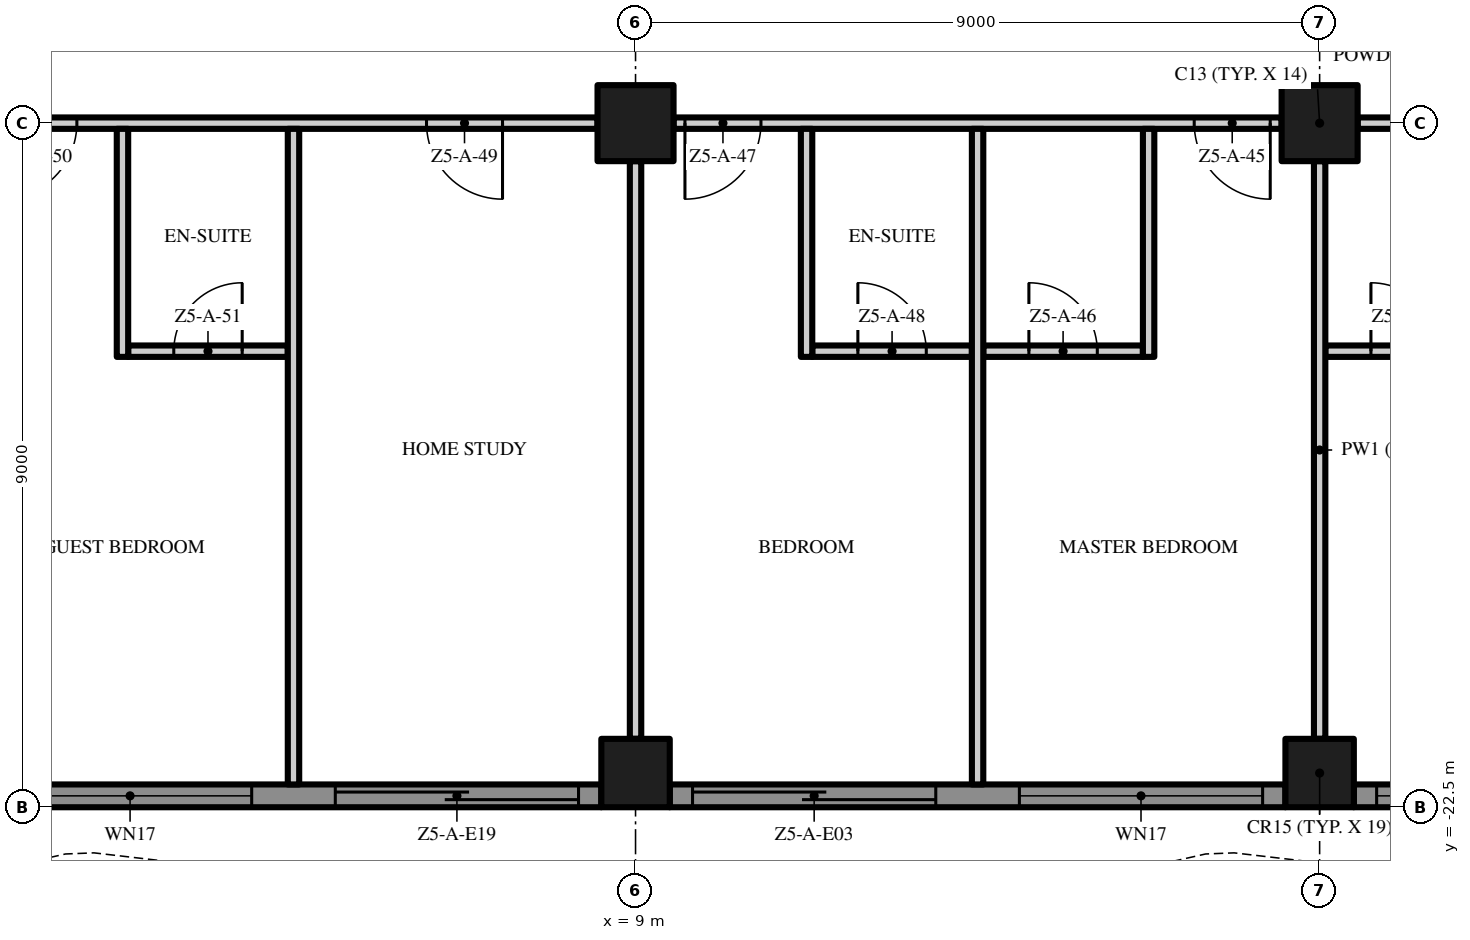
"""IFC4 building model, lengths in metres.
Left out: names, types, materials, properties, quantities, classifications, styles, units other than length and angle.
Written with IfcOpenShell. Run it as: python <this file> out.ifc"""

import sys

from ifc_helpers import new_model, si_unit, direction, frame, frame_2d, origin, origin_2d, place, context, subcontext, project, spatial, polyline, rectangle, outline, extrude, element, fill, save


model = new_model("IFC4")
c1 = context("Model", 3, precision=1e-05, world=origin(), true_north=direction((0.0, 1.0)))
c2 = subcontext(c1, "Body", "Model", "MODEL_VIEW")
j1 = project(units=[si_unit("LENGTHUNIT", "METRE"), si_unit("PLANEANGLEUNIT", "RADIAN")], contexts=[c1])
p1 = place(None, origin())
s1 = spatial("IfcSite", under=j1, at=p1, CompositionType="ELEMENT")
p2 = place(p1, origin())
s2 = spatial("IfcBuilding", under=s1, at=p2, CompositionType="ELEMENT")
p3 = place(p2, frame((0.0, 0.0, 246.4)))
s3 = spatial("IfcBuildingStorey", under=s2, at=p3, CompositionType="ELEMENT", Elevation=246.4)
p4 = place(p3, frame((18.0, -13.5, 0.0), z_axis=(0.0, 0.0, 1.0), x_axis=(1.0, 0.0, 0.0)))
e1 = element("IfcColumn", 1, at=p4, inside=s3, PredefinedType="COLUMN", context=c2, shape_type="SweptSolid", body=[
    extrude(rectangle(XDim=1.0, YDim=1.0, at=origin_2d()), origin(), (0.0, 0.0, 1.0), 3.5),
])
p5 = place(p3, frame((18.0, -22.05, 0.0), z_axis=(0.0, 0.0, 1.0), x_axis=(1.0, 0.0, 0.0)))
e2 = element("IfcColumn", 2, at=p5, inside=s3, PredefinedType="COLUMN", context=c2, shape_type="SweptSolid", body=[
    extrude(rectangle(XDim=0.9, YDim=0.9, at=origin_2d()), origin(), (0.0, 0.0, 1.0), 3.5),
])
p6 = place(p3, frame((9.0, -13.5, 0.0), z_axis=(0.0, 0.0, 1.0), x_axis=(1.0, 0.0, 0.0)))
e3 = element("IfcColumn", 3, at=p6, inside=s3, PredefinedType="COLUMN", context=c2, shape_type="SweptSolid", body=[
    extrude(rectangle(XDim=1.0, YDim=1.0, at=origin_2d()), origin(), (0.0, 0.0, 1.0), 3.5),
])
p7 = place(p3, frame((9.0, -22.05, 0.0), z_axis=(0.0, 0.0, 1.0), x_axis=(1.0, 0.0, 0.0)))
e4 = element("IfcColumn", 4, at=p7, inside=s3, PredefinedType="COLUMN", context=c2, shape_type="SweptSolid", body=[
    extrude(rectangle(XDim=0.9, YDim=0.9, at=origin_2d()), origin(), (0.0, 0.0, 1.0), 3.5),
])
p8 = place(p3, frame((8.55, -22.35, 0.0), z_axis=(0.0, 0.0, 1.0), x_axis=(-1.0, 0.0, 0.0)))
e5 = element("IfcWall", 5, at=p8, inside=s3, PredefinedType="SOLIDWALL", context=c2, shape_type="SweptSolid", body=[
    extrude(rectangle(XDim=8.1, YDim=0.3, at=frame_2d((4.05, 0.0))), origin(), (0.0, 0.0, 1.0), 3.5),
])
p9 = place(p8, frame((4.6, 0.0, 0.45)))
e6 = element("IfcOpeningElement", 6, at=p9, cuts=e5, PredefinedType="OPENING", context=c2, shape_type="SweptSolid", body=[
    extrude(rectangle(XDim=3.2, YDim=2.65, at=frame_2d((1.6, 1.325))), frame((0.0, 0.16, 0.0), z_axis=(0.0, -1.0, 0.0), x_axis=(1.0, 0.0, 0.0)), (0.0, 0.0, 1.0), 0.32),
])
p10 = place(p8, frame((0.3, 0.0, 0.0)))
e7 = element("IfcOpeningElement", 7, at=p10, cuts=e5, PredefinedType="OPENING", context=c2, shape_type="SweptSolid", body=[
    extrude(rectangle(XDim=3.2, YDim=2.4, at=frame_2d((1.6, 1.2))), frame((0.0, 0.16, 0.0), z_axis=(0.0, -1.0, 0.0), x_axis=(1.0, 0.0, 0.0)), (0.0, 0.0, 1.0), 0.32),
])
p11 = place(p3, frame((17.55, -22.35, 0.0), z_axis=(0.0, 0.0, 1.0), x_axis=(-1.0, 0.0, 0.0)))
e8 = element("IfcWall", 8, at=p11, inside=s3, PredefinedType="SOLIDWALL", context=c2, shape_type="SweptSolid", body=[
    extrude(rectangle(XDim=8.1, YDim=0.3, at=frame_2d((4.05, 0.0))), origin(), (0.0, 0.0, 1.0), 3.5),
])
p12 = place(p11, frame((4.6, 0.0, 0.0)))
e9 = element("IfcOpeningElement", 9, at=p12, cuts=e8, PredefinedType="OPENING", context=c2, shape_type="SweptSolid", body=[
    extrude(rectangle(XDim=3.2, YDim=2.4, at=frame_2d((1.6, 1.2))), frame((0.0, 0.16, 0.0), z_axis=(0.0, -1.0, 0.0), x_axis=(1.0, 0.0, 0.0)), (0.0, 0.0, 1.0), 0.32),
])
p13 = place(p11, frame((0.3, 0.0, 0.45)))
e10 = element("IfcOpeningElement", 10, at=p13, cuts=e8, PredefinedType="OPENING", context=c2, shape_type="SweptSolid", body=[
    extrude(rectangle(XDim=3.2, YDim=2.65, at=frame_2d((1.6, 1.325))), frame((0.0, 0.16, 0.0), z_axis=(0.0, -1.0, 0.0), x_axis=(1.0, 0.0, 0.0)), (0.0, 0.0, 1.0), 0.32),
])
p14 = place(p3, frame((22.5, -22.35, 0.0), z_axis=(0.0, 0.0, 1.0), x_axis=(-1.0, 0.0, 0.0)))
e11 = element("IfcWall", 11, at=p14, inside=s3, PredefinedType="SOLIDWALL", context=c2, shape_type="SweptSolid", body=[
    extrude(rectangle(XDim=4.05, YDim=0.3, at=frame_2d((2.025, 0.0))), origin(), (0.0, 0.0, 1.0), 3.5),
])
p15 = place(p14, frame((0.55, 0.0, 0.45)))
e12 = element("IfcOpeningElement", 12, at=p15, cuts=e11, PredefinedType="OPENING", context=c2, shape_type="SweptSolid", body=[
    extrude(rectangle(XDim=3.2, YDim=2.65, at=frame_2d((1.6, 1.325))), frame((0.0, 0.16, 0.0), z_axis=(0.0, -1.0, 0.0), x_axis=(1.0, 0.0, 0.0)), (0.0, 0.0, 1.0), 0.32),
])
p16 = place(p3, origin())
e13 = element("IfcWall", 13, at=p16, inside=s3, PredefinedType="USERDEFINED", context=c2, shape_type="SweptSolid", body=[
    extrude(outline(polyline([(-22.5, -25.149), (-21.0, -25.485), (-20.625, -25.5), (-19.5, -25.369), (-18.0, -24.845), (-16.5, -24.112), (-15.0, -23.451), (-13.5, -23.115), (-13.125, -23.1), (-12.0, -23.231), (-10.5, -23.755), (-9.0, -24.488), (-7.5, -25.149), (-6.0, -25.485), (-5.625, -25.5), (-4.5, -25.369), (-3.0, -24.845), (-1.5, -24.112), (0.0, -23.451), (1.5, -23.115), (1.875, -23.1), (3.0, -23.231), (4.5, -23.755), (6.0, -24.488), (7.5, -25.149), (9.0, -25.485), (9.375, -25.5), (10.5, -25.369), (12.0, -24.845), (13.5, -24.112), (15.0, -23.451), (16.5, -23.115), (16.875, -23.1), (18.0, -23.231), (19.5, -23.755), (21.0, -24.488), (22.5, -25.149), (22.601, -24.92), (21.105, -24.261), (19.596, -23.524), (18.056, -22.986), (16.885, -22.849), (16.467, -22.866), (14.921, -23.213), (13.395, -23.885), (11.904, -24.614), (10.444, -25.124), (9.365, -25.249), (9.033, -25.236), (7.579, -24.91), (6.105, -24.261), (4.596, -23.524), (3.056, -22.986), (1.885, -22.849), (1.467, -22.866), (-0.079, -23.213), (-1.605, -23.885), (-3.096, -24.614), (-4.556, -25.124), (-5.635, -25.249), (-5.967, -25.236), (-7.421, -24.91), (-8.895, -24.261), (-10.404, -23.524), (-11.944, -22.986), (-13.115, -22.849), (-13.533, -22.866), (-15.079, -23.213), (-16.605, -23.885), (-18.096, -24.614), (-19.556, -25.124), (-20.635, -25.249), (-20.967, -25.236), (-22.445, -24.905), (-22.5, -25.149)])), origin(), (0.0, 0.0, 1.0), 0.9),
])
p17 = place(p3, frame((2.325, -16.5, 0.0), z_axis=(0.0, 0.0, 1.0), x_axis=(1.0, 0.0, 0.0)))
e14 = element("IfcWall", 14, at=p17, inside=s3, PredefinedType="PARTITIONING", context=c2, shape_type="SweptSolid", body=[
    extrude(rectangle(XDim=2.1, YDim=0.15, at=frame_2d((1.05, 0.0))), origin(), (0.0, 0.0, 1.0), 3.5),
])
p18 = place(p17, frame((0.6, 0.0, 0.0)))
e15 = element("IfcOpeningElement", 15, at=p18, cuts=e14, PredefinedType="OPENING", context=c2, shape_type="SweptSolid", body=[
    extrude(rectangle(XDim=0.9, YDim=2.1, at=frame_2d((0.45, 1.05))), frame((0.0, 0.085, 0.0), z_axis=(0.0, -1.0, 0.0), x_axis=(1.0, 0.0, 0.0)), (0.0, 0.0, 1.0), 0.17),
])
p19 = place(p3, frame((11.325, -16.5, 0.0), z_axis=(0.0, 0.0, 1.0), x_axis=(1.0, 0.0, 0.0)))
e16 = element("IfcWall", 16, at=p19, inside=s3, PredefinedType="PARTITIONING", context=c2, shape_type="SweptSolid", body=[
    extrude(rectangle(XDim=2.1, YDim=0.15, at=frame_2d((1.05, 0.0))), origin(), (0.0, 0.0, 1.0), 3.5),
])
p20 = place(p19, frame((0.6, 0.0, 0.0)))
e17 = element("IfcOpeningElement", 17, at=p20, cuts=e16, PredefinedType="OPENING", context=c2, shape_type="SweptSolid", body=[
    extrude(rectangle(XDim=0.9, YDim=2.1, at=frame_2d((0.45, 1.05))), frame((0.0, 0.085, 0.0), z_axis=(0.0, -1.0, 0.0), x_axis=(1.0, 0.0, 0.0)), (0.0, 0.0, 1.0), 0.17),
])
p21 = place(p3, frame((13.575, -16.5, 0.0), z_axis=(0.0, 0.0, 1.0), x_axis=(1.0, 0.0, 0.0)))
e18 = element("IfcWall", 18, at=p21, inside=s3, PredefinedType="PARTITIONING", context=c2, shape_type="SweptSolid", body=[
    extrude(rectangle(XDim=2.1, YDim=0.15, at=frame_2d((1.05, 0.0))), origin(), (0.0, 0.0, 1.0), 3.5),
])
p22 = place(p21, frame((0.6, 0.0, 0.0)))
e19 = element("IfcOpeningElement", 19, at=p22, cuts=e18, PredefinedType="OPENING", context=c2, shape_type="SweptSolid", body=[
    extrude(rectangle(XDim=0.9, YDim=2.1, at=frame_2d((0.45, 1.05))), frame((0.0, 0.085, 0.0), z_axis=(0.0, -1.0, 0.0), x_axis=(1.0, 0.0, 0.0)), (0.0, 0.0, 1.0), 0.17),
])
p23 = place(p3, frame((18.075, -16.5, 0.0), z_axis=(0.0, 0.0, 1.0), x_axis=(1.0, 0.0, 0.0)))
e20 = element("IfcWall", 20, at=p23, inside=s3, PredefinedType="PARTITIONING", context=c2, shape_type="SweptSolid", body=[
    extrude(rectangle(XDim=2.1, YDim=0.15, at=frame_2d((1.05, 0.0))), origin(), (0.0, 0.0, 1.0), 3.5),
])
p24 = place(p23, frame((0.6, 0.0, 0.0)))
e21 = element("IfcOpeningElement", 21, at=p24, cuts=e20, PredefinedType="OPENING", context=c2, shape_type="SweptSolid", body=[
    extrude(rectangle(XDim=0.9, YDim=2.1, at=frame_2d((0.45, 1.05))), frame((0.0, 0.085, 0.0), z_axis=(0.0, -1.0, 0.0), x_axis=(1.0, 0.0, 0.0)), (0.0, 0.0, 1.0), 0.17),
])
p25 = place(p3, frame((8.5, -13.5, 0.0), z_axis=(0.0, 0.0, 1.0), x_axis=(-1.0, 0.0, 0.0)))
e22 = element("IfcWall", 22, at=p25, inside=s3, PredefinedType="PARTITIONING", context=c2, shape_type="SweptSolid", body=[
    extrude(rectangle(XDim=8.0, YDim=0.15, at=frame_2d((4.0, 0.0))), origin(), (0.0, 0.0, 1.0), 3.5),
])
p26 = place(p25, frame((1.25, 0.0, 0.0)))
e23 = element("IfcOpeningElement", 23, at=p26, cuts=e22, PredefinedType="OPENING", context=c2, shape_type="SweptSolid", body=[
    extrude(rectangle(XDim=1.0, YDim=2.4, at=frame_2d((0.5, 1.2))), frame((0.0, 0.085, 0.0), z_axis=(0.0, -1.0, 0.0), x_axis=(1.0, 0.0, 0.0)), (0.0, 0.0, 1.0), 0.17),
])
p27 = place(p25, frame((6.85, 0.0, 0.0)))
e24 = element("IfcOpeningElement", 24, at=p27, cuts=e22, PredefinedType="OPENING", context=c2, shape_type="SweptSolid", body=[
    extrude(rectangle(XDim=1.0, YDim=2.4, at=frame_2d((0.5, 1.2))), frame((0.0, 0.085, 0.0), z_axis=(0.0, -1.0, 0.0), x_axis=(1.0, 0.0, 0.0)), (0.0, 0.0, 1.0), 0.17),
])
p28 = place(p3, frame((17.5, -13.5, 0.0), z_axis=(0.0, 0.0, 1.0), x_axis=(-1.0, 0.0, 0.0)))
e25 = element("IfcWall", 25, at=p28, inside=s3, PredefinedType="PARTITIONING", context=c2, shape_type="SweptSolid", body=[
    extrude(rectangle(XDim=8.0, YDim=0.15, at=frame_2d((4.0, 0.0))), origin(), (0.0, 0.0, 1.0), 3.5),
])
p29 = place(p28, frame((0.15, 0.0, 0.0)))
e26 = element("IfcOpeningElement", 26, at=p29, cuts=e25, PredefinedType="OPENING", context=c2, shape_type="SweptSolid", body=[
    extrude(rectangle(XDim=1.0, YDim=2.4, at=frame_2d((0.5, 1.2))), frame((0.0, 0.085, 0.0), z_axis=(0.0, -1.0, 0.0), x_axis=(1.0, 0.0, 0.0)), (0.0, 0.0, 1.0), 0.17),
])
p30 = place(p28, frame((6.85, 0.0, 0.0)))
e27 = element("IfcOpeningElement", 27, at=p30, cuts=e25, PredefinedType="OPENING", context=c2, shape_type="SweptSolid", body=[
    extrude(rectangle(XDim=1.0, YDim=2.4, at=frame_2d((0.5, 1.2))), frame((0.0, 0.085, 0.0), z_axis=(0.0, -1.0, 0.0), x_axis=(1.0, 0.0, 0.0)), (0.0, 0.0, 1.0), 0.17),
])
p31 = place(p3, frame((26.1, -13.5, 0.0), z_axis=(0.0, 0.0, 1.0), x_axis=(-1.0, 0.0, 0.0)))
e28 = element("IfcWall", 28, at=p31, inside=s3, PredefinedType="PARTITIONING", context=c2, shape_type="SweptSolid", body=[
    extrude(rectangle(XDim=7.6, YDim=0.15, at=frame_2d((3.8, 0.0))), origin(), (0.0, 0.0, 1.0), 3.5),
])
p32 = place(p31, frame((1.6, 0.0, 0.0)))
e29 = element("IfcOpeningElement", 29, at=p32, cuts=e28, PredefinedType="OPENING", context=c2, shape_type="SweptSolid", body=[
    extrude(rectangle(XDim=1.8, YDim=2.4, at=frame_2d((0.9, 1.2))), frame((0.0, 0.085, 0.0), z_axis=(0.0, -1.0, 0.0), x_axis=(1.0, 0.0, 0.0)), (0.0, 0.0, 1.0), 0.17),
])
p33 = place(p3, frame((2.25, -16.575, 0.0), z_axis=(0.0, 0.0, 1.0), x_axis=(0.0, 1.0, 0.0)))
e30 = element("IfcWall", 30, at=p33, inside=s3, PredefinedType="PARTITIONING", context=c2, shape_type="SweptSolid", body=[
    extrude(rectangle(XDim=3.0, YDim=0.15, at=frame_2d((1.5, 0.0))), origin(), (0.0, 0.0, 1.0), 3.5),
])
p34 = place(p3, frame((4.5, -22.2, 0.0), z_axis=(0.0, 0.0, 1.0), x_axis=(0.0, 1.0, 0.0)))
e31 = element("IfcWall", 31, at=p34, inside=s3, PredefinedType="PARTITIONING", context=c2, shape_type="SweptSolid", body=[
    extrude(rectangle(XDim=8.625, YDim=0.15, at=frame_2d((4.312, 0.0))), origin(), (0.0, 0.0, 1.0), 3.5),
])
p35 = place(p3, frame((9.0, -21.6, 0.0), z_axis=(0.0, 0.0, 1.0), x_axis=(0.0, 1.0, 0.0)))
e32 = element("IfcWall", 32, at=p35, inside=s3, PredefinedType="PARTITIONING", context=c2, shape_type="SweptSolid", body=[
    extrude(rectangle(XDim=7.6, YDim=0.15, at=frame_2d((3.8, 0.0))), origin(), (0.0, 0.0, 1.0), 3.5),
])
p36 = place(p3, frame((11.25, -16.575, 0.0), z_axis=(0.0, 0.0, 1.0), x_axis=(0.0, 1.0, 0.0)))
e33 = element("IfcWall", 33, at=p36, inside=s3, PredefinedType="PARTITIONING", context=c2, shape_type="SweptSolid", body=[
    extrude(rectangle(XDim=3.0, YDim=0.15, at=frame_2d((1.5, 0.0))), origin(), (0.0, 0.0, 1.0), 3.5),
])
p37 = place(p3, frame((13.5, -22.2, 0.0), z_axis=(0.0, 0.0, 1.0), x_axis=(0.0, 1.0, 0.0)))
e34 = element("IfcWall", 34, at=p37, inside=s3, PredefinedType="PARTITIONING", context=c2, shape_type="SweptSolid", body=[
    extrude(rectangle(XDim=8.625, YDim=0.15, at=frame_2d((4.312, 0.0))), origin(), (0.0, 0.0, 1.0), 3.5),
])
p38 = place(p3, frame((15.75, -16.575, 0.0), z_axis=(0.0, 0.0, 1.0), x_axis=(0.0, 1.0, 0.0)))
e35 = element("IfcWall", 35, at=p38, inside=s3, PredefinedType="PARTITIONING", context=c2, shape_type="SweptSolid", body=[
    extrude(rectangle(XDim=3.0, YDim=0.15, at=frame_2d((1.5, 0.0))), origin(), (0.0, 0.0, 1.0), 3.5),
])
p39 = place(p3, frame((18.0, -21.6, 0.0), z_axis=(0.0, 0.0, 1.0), x_axis=(0.0, 1.0, 0.0)))
e36 = element("IfcWall", 36, at=p39, inside=s3, PredefinedType="PARTITIONING", context=c2, shape_type="SweptSolid", body=[
    extrude(rectangle(XDim=7.6, YDim=0.15, at=frame_2d((3.8, 0.0))), origin(), (0.0, 0.0, 1.0), 3.5),
])
p40 = place(p9, origin())
e37 = element("IfcWindow", 37, at=p40, inside=s3, PartitioningType="SINGLE_PANEL", PredefinedType="WINDOW", context=c2, shape_type="SweptSolid", body=[
    extrude(rectangle(XDim=3.2, YDim=2.65, at=frame_2d((1.6, 1.325))), frame((0.0, 0.03, 0.0), z_axis=(0.0, -1.0, 0.0), x_axis=(1.0, 0.0, 0.0)), (0.0, 0.0, 1.0), 0.06),
])
fill(e6, e37)
p41 = place(p10, origin())
e38 = element("IfcDoor", 38, at=p41, inside=s3, OperationType="SINGLE_SWING_LEFT", PredefinedType="DOOR", context=c2, shape_type="SweptSolid", body=[
    extrude(rectangle(XDim=3.2, YDim=2.4, at=frame_2d((1.6, 1.2))), frame((0.0, 0.025, 0.0), z_axis=(0.0, -1.0, 0.0), x_axis=(1.0, 0.0, 0.0)), (0.0, 0.0, 1.0), 0.05),
])
fill(e7, e38)
p42 = place(p12, origin())
e39 = element("IfcDoor", 39, at=p42, inside=s3, OperationType="SINGLE_SWING_LEFT", PredefinedType="DOOR", context=c2, shape_type="SweptSolid", body=[
    extrude(rectangle(XDim=3.2, YDim=2.4, at=frame_2d((1.6, 1.2))), frame((0.0, 0.025, 0.0), z_axis=(0.0, -1.0, 0.0), x_axis=(1.0, 0.0, 0.0)), (0.0, 0.0, 1.0), 0.05),
])
fill(e9, e39)
p43 = place(p13, origin())
e40 = element("IfcWindow", 40, at=p43, inside=s3, PartitioningType="SINGLE_PANEL", PredefinedType="WINDOW", context=c2, shape_type="SweptSolid", body=[
    extrude(rectangle(XDim=3.2, YDim=2.65, at=frame_2d((1.6, 1.325))), frame((0.0, 0.03, 0.0), z_axis=(0.0, -1.0, 0.0), x_axis=(1.0, 0.0, 0.0)), (0.0, 0.0, 1.0), 0.06),
])
fill(e10, e40)
p44 = place(p15, origin())
e41 = element("IfcWindow", 41, at=p44, inside=s3, PartitioningType="SINGLE_PANEL", PredefinedType="WINDOW", context=c2, shape_type="SweptSolid", body=[
    extrude(rectangle(XDim=3.2, YDim=2.65, at=frame_2d((1.6, 1.325))), frame((0.0, 0.03, 0.0), z_axis=(0.0, -1.0, 0.0), x_axis=(1.0, 0.0, 0.0)), (0.0, 0.0, 1.0), 0.06),
])
fill(e12, e41)
p45 = place(p24, origin())
e42 = element("IfcDoor", 42, at=p45, inside=s3, OperationType="SINGLE_SWING_LEFT", PredefinedType="DOOR", context=c2, shape_type="SweptSolid", body=[
    extrude(rectangle(XDim=0.9, YDim=2.1, at=frame_2d((0.45, 1.05))), frame((0.0, 0.025, 0.0), z_axis=(0.0, -1.0, 0.0), x_axis=(1.0, 0.0, 0.0)), (0.0, 0.0, 1.0), 0.05),
])
fill(e21, e42)
p46 = place(p29, origin())
e43 = element("IfcDoor", 43, at=p46, inside=s3, OperationType="SINGLE_SWING_LEFT", PredefinedType="DOOR", context=c2, shape_type="SweptSolid", body=[
    extrude(rectangle(XDim=1.0, YDim=2.4, at=frame_2d((0.5, 1.2))), frame((0.0, 0.025, 0.0), z_axis=(0.0, -1.0, 0.0), x_axis=(1.0, 0.0, 0.0)), (0.0, 0.0, 1.0), 0.05),
])
fill(e26, e43)
p47 = place(p22, origin())
e44 = element("IfcDoor", 44, at=p47, inside=s3, OperationType="SINGLE_SWING_LEFT", PredefinedType="DOOR", context=c2, shape_type="SweptSolid", body=[
    extrude(rectangle(XDim=0.9, YDim=2.1, at=frame_2d((0.45, 1.05))), frame((0.0, 0.025, 0.0), z_axis=(0.0, -1.0, 0.0), x_axis=(1.0, 0.0, 0.0)), (0.0, 0.0, 1.0), 0.05),
])
fill(e19, e44)
p48 = place(p30, origin())
e45 = element("IfcDoor", 45, at=p48, inside=s3, OperationType="SINGLE_SWING_RIGHT", PredefinedType="DOOR", context=c2, shape_type="SweptSolid", body=[
    extrude(rectangle(XDim=1.0, YDim=2.4, at=frame_2d((0.5, 1.2))), frame((0.0, 0.025, 0.0), z_axis=(0.0, -1.0, 0.0), x_axis=(1.0, 0.0, 0.0)), (0.0, 0.0, 1.0), 0.05),
])
fill(e27, e45)
p49 = place(p20, origin())
e46 = element("IfcDoor", 46, at=p49, inside=s3, OperationType="SINGLE_SWING_LEFT", PredefinedType="DOOR", context=c2, shape_type="SweptSolid", body=[
    extrude(rectangle(XDim=0.9, YDim=2.1, at=frame_2d((0.45, 1.05))), frame((0.0, 0.025, 0.0), z_axis=(0.0, -1.0, 0.0), x_axis=(1.0, 0.0, 0.0)), (0.0, 0.0, 1.0), 0.05),
])
fill(e17, e46)
p50 = place(p26, origin())
e47 = element("IfcDoor", 47, at=p50, inside=s3, OperationType="SINGLE_SWING_LEFT", PredefinedType="DOOR", context=c2, shape_type="SweptSolid", body=[
    extrude(rectangle(XDim=1.0, YDim=2.4, at=frame_2d((0.5, 1.2))), frame((0.0, 0.025, 0.0), z_axis=(0.0, -1.0, 0.0), x_axis=(1.0, 0.0, 0.0)), (0.0, 0.0, 1.0), 0.05),
])
fill(e23, e47)
p51 = place(p27, origin())
e48 = element("IfcDoor", 48, at=p51, inside=s3, OperationType="SINGLE_SWING_RIGHT", PredefinedType="DOOR", context=c2, shape_type="SweptSolid", body=[
    extrude(rectangle(XDim=1.0, YDim=2.4, at=frame_2d((0.5, 1.2))), frame((0.0, 0.025, 0.0), z_axis=(0.0, -1.0, 0.0), x_axis=(1.0, 0.0, 0.0)), (0.0, 0.0, 1.0), 0.05),
])
fill(e24, e48)
p52 = place(p18, origin())
e49 = element("IfcDoor", 49, at=p52, inside=s3, OperationType="SINGLE_SWING_RIGHT", PredefinedType="DOOR", context=c2, shape_type="SweptSolid", body=[
    extrude(rectangle(XDim=0.9, YDim=2.1, at=frame_2d((0.45, 1.05))), frame((0.0, 0.025, 0.0), z_axis=(0.0, -1.0, 0.0), x_axis=(1.0, 0.0, 0.0)), (0.0, 0.0, 1.0), 0.05),
])
fill(e15, e49)
save(model, sys.argv[1])
